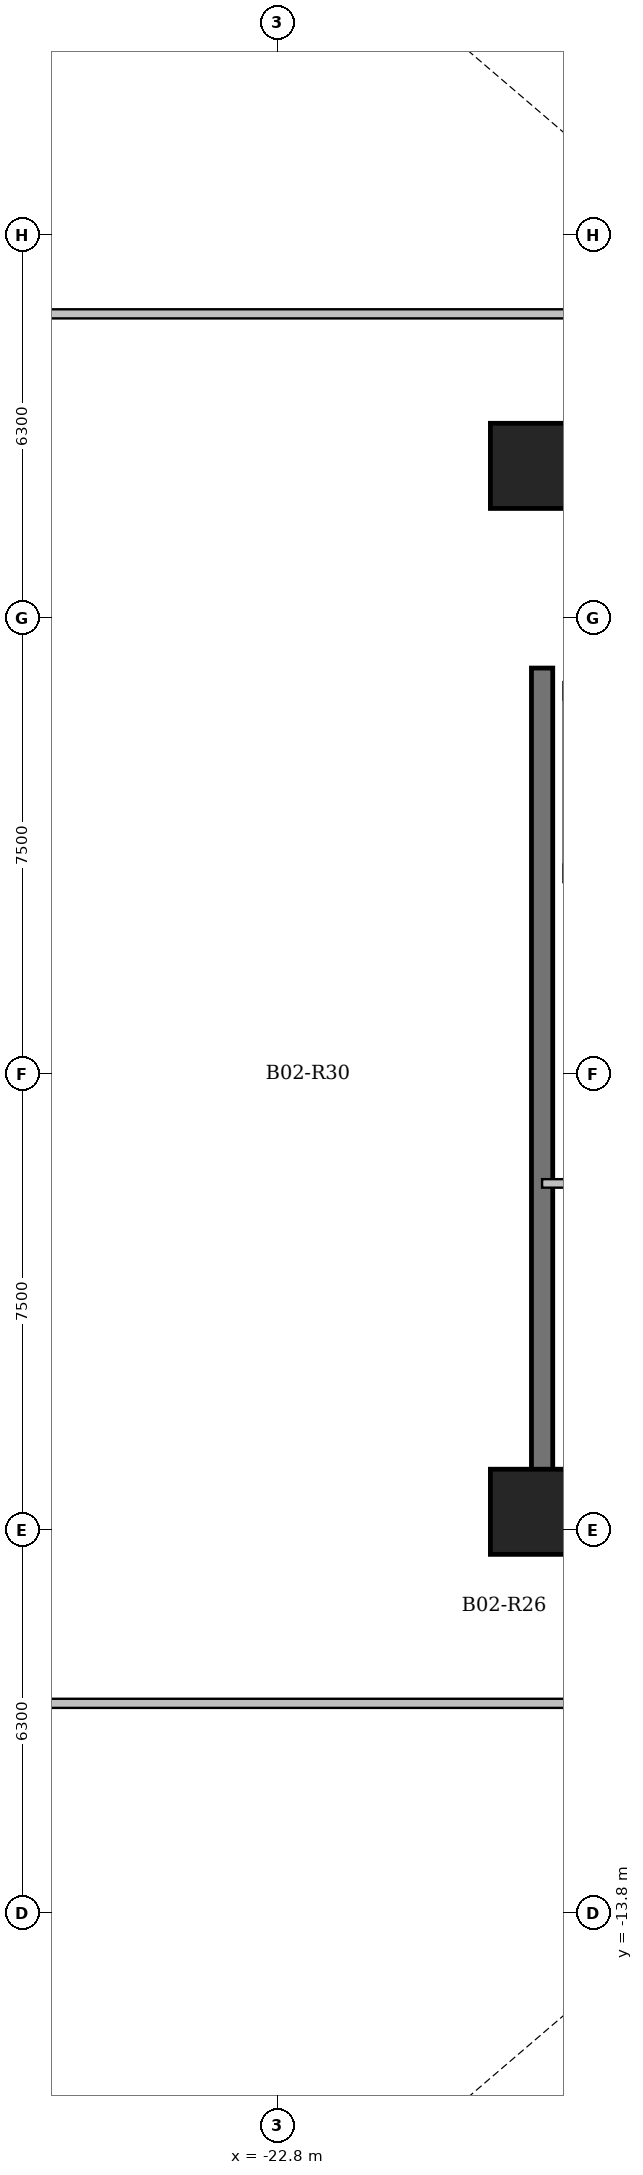
"""IFC4 building model, lengths in metres.
Left out: names, types, materials, properties, quantities, classifications, styles, units other than length and angle.
Written with IfcOpenShell. Run it as: python <this file> out.ifc"""

import sys

from ifc_helpers import new_model, si_unit, direction, frame, frame_2d, origin, origin_2d, place, context, subcontext, project, spatial, rectangle, extrude, element, save


model = new_model("IFC4")
c1 = context("Model", 3, precision=1e-05, world=origin(), true_north=direction((0.0, 1.0)))
c2 = subcontext(c1, "Body", "Model", "MODEL_VIEW")
j1 = project(units=[si_unit("LENGTHUNIT", "METRE"), si_unit("PLANEANGLEUNIT", "RADIAN")], contexts=[c1])
p1 = place(None, origin())
s1 = spatial("IfcSite", under=j1, at=p1, CompositionType="ELEMENT")
p2 = place(p1, origin())
s2 = spatial("IfcBuilding", under=s1, at=p2, CompositionType="ELEMENT")
p3 = place(p2, frame((0.0, 0.0, -9.2)))
s3 = spatial("IfcBuildingStorey", under=s2, at=p3, CompositionType="ELEMENT", Elevation=-9.2)
for number, where, z_axis, x_axis in (
    (1, (-18.6, -7.2, 0.0), (0.0, 0.0, 1.0), (1.0, 0.0, 0.0)),
    (2, (-18.6, 10.0, 0.0), (0.0, 0.0, 1.0), (1.0, 0.0, 0.0)),
):
    element("IfcColumn", number, at=place(p3, frame(where, z_axis=z_axis, x_axis=x_axis)), inside=s3, PredefinedType="COLUMN", context=c2, shape_type="SweptSolid", body=[
        extrude(rectangle(XDim=1.4, YDim=1.4, at=origin_2d()), origin(), (0.0, 0.0, 1.0), 4.6),
    ])
p4 = place(p3, frame((-18.45, -7.375, 0.0), z_axis=(0.0, 0.0, 1.0), x_axis=(0.0, 1.0, 0.0)))
e3 = element("IfcWall", 3, at=p4, inside=s3, PredefinedType="SHEAR", context=c2, shape_type="SweptSolid", body=[
    extrude(rectangle(XDim=14.05, YDim=0.35, at=frame_2d((7.025, 0.0))), origin(), (0.0, 0.0, 1.0), 4.6),
])
p5 = place(p3, frame((-18.625, -7.2, 0.0), z_axis=(0.0, 0.0, 1.0), x_axis=(1.0, 0.0, 0.0)))
e4 = element("IfcWall", 4, at=p5, inside=s3, PredefinedType="SHEAR", context=c2, shape_type="SweptSolid", body=[
    extrude(rectangle(XDim=8.55, YDim=0.35, at=frame_2d((4.275, 0.0))), origin(), (0.0, 0.0, 1.0), 4.6),
])
p6 = place(p3, frame((-18.45, -1.8, 0.0), z_axis=(0.0, 0.0, 1.0), x_axis=(1.0, 0.0, 0.0)))
e5 = element("IfcWall", 5, at=p6, inside=s3, PredefinedType="PARTITIONING", context=c2, shape_type="SweptSolid", body=[
    extrude(rectangle(XDim=3.05, YDim=0.14, at=frame_2d((1.525, 0.0))), origin(), (0.0, 0.0, 1.0), 4.3),
])
p7 = place(p6, frame((1.05, 0.0, 0.0)))
e6 = element("IfcOpeningElement", 6, at=p7, cuts=e5, PredefinedType="OPENING", context=c2, shape_type="SweptSolid", body=[
    extrude(rectangle(XDim=0.9, YDim=2.08, at=frame_2d((0.45, 1.04))), frame((0.0, 0.08, 0.0), z_axis=(0.0, -1.0, 0.0), x_axis=(1.0, 0.0, 0.0)), (0.0, 0.0, 1.0), 0.16),
])
p8 = place(p3, frame((-28.0, 12.5, 0.0), z_axis=(0.0, 0.0, 1.0), x_axis=(1.0, 0.0, 0.0)))
e7 = element("IfcWall", 7, at=p8, inside=s3, PredefinedType="PARTITIONING", context=c2, shape_type="SweptSolid", body=[
    extrude(rectangle(XDim=24.15, YDim=0.15, at=frame_2d((12.075, 0.0))), origin(), (0.0, 0.0, 1.0), 4.3),
])
p9 = place(p3, frame((-28.0, -10.35, 0.0), z_axis=(0.0, 0.0, 1.0), x_axis=(1.0, 0.0, 0.0)))
e8 = element("IfcWall", 8, at=p9, inside=s3, PredefinedType="PARTITIONING", context=c2, shape_type="SweptSolid", body=[
    extrude(rectangle(XDim=19.45, YDim=0.15, at=frame_2d((9.725, 0.0))), origin(), (0.0, 0.0, 1.0), 4.3),
])
save(model, sys.argv[1])
